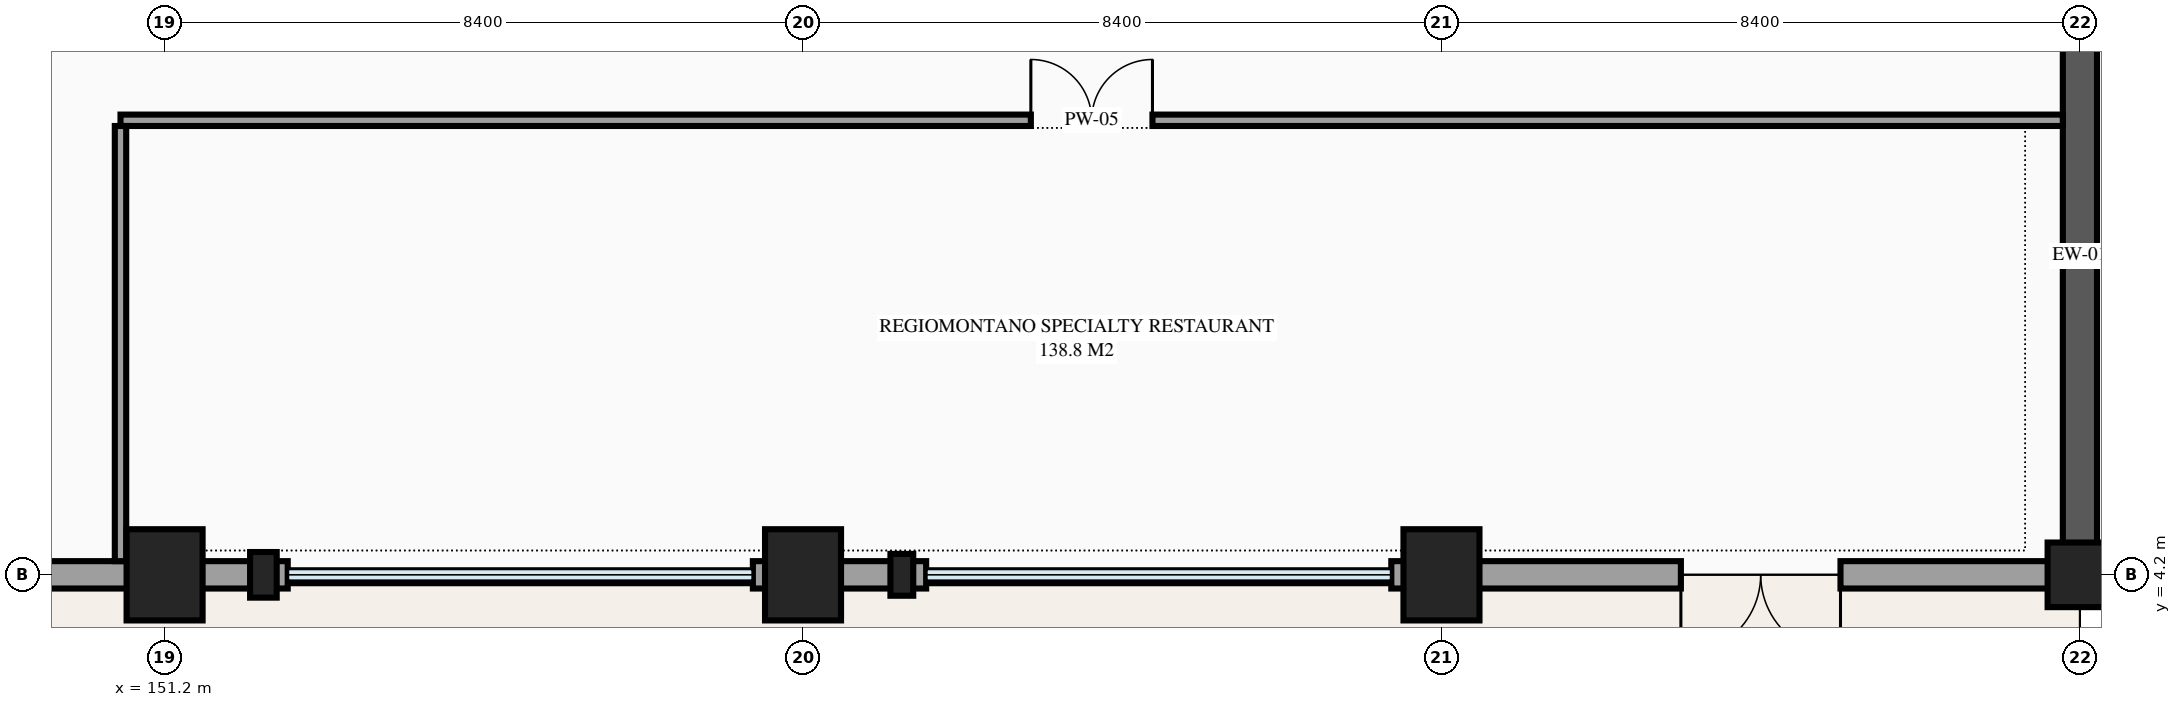
"""IFC4 building model, lengths in metres.
Left out: names, types, materials, properties, quantities, classifications, styles, units other than length and angle.
Written with IfcOpenShell. Run it as: python <this file> out.ifc"""

import sys

from ifc_helpers import new_model, si_unit, direction, frame, frame_2d, origin, origin_2d, place, context, subcontext, project, spatial, rectangle, extrude, element, fill, save


model = new_model("IFC4")
c1 = context("Model", 3, precision=1e-05, world=origin(), true_north=direction((0.0, 1.0)))
c2 = subcontext(c1, "Body", "Model", "MODEL_VIEW")
j1 = project(units=[si_unit("LENGTHUNIT", "METRE"), si_unit("PLANEANGLEUNIT", "RADIAN")], contexts=[c1])
p1 = place(None, origin())
s1 = spatial("IfcSite", under=j1, at=p1, CompositionType="ELEMENT")
p2 = place(p1, origin())
s2 = spatial("IfcBuilding", under=s1, at=p2, CompositionType="ELEMENT")
p3 = place(p2, origin())
s3 = spatial("IfcBuildingStorey", under=s2, at=p3, CompositionType="ELEMENT", Elevation=0.0)
for number, where, z_axis, x_axis in (
    (1, (151.2, 4.2, 0.0), (0.0, 0.0, 1.0), (1.0, 0.0, 0.0)),
    (2, (159.6, 4.2, 0.0), (0.0, 0.0, 1.0), (1.0, 0.0, 0.0)),
    (3, (168.0, 4.2, 0.0), (0.0, 0.0, 1.0), (1.0, 0.0, 0.0)),
):
    element("IfcColumn", number, at=place(p3, frame(where, z_axis=z_axis, x_axis=x_axis)), inside=s3, PredefinedType="COLUMN", context=c2, shape_type="SweptSolid", body=[
        extrude(rectangle(XDim=1.0, YDim=1.2, at=origin_2d()), origin(), (0.0, 0.0, 1.0), 5.4),
    ])
p4 = place(p3, frame((176.4, 4.2, 0.0), z_axis=(0.0, 0.0, 1.0), x_axis=(1.0, 0.0, 0.0)))
e4 = element("IfcColumn", 4, at=p4, inside=s3, PredefinedType="COLUMN", context=c2, shape_type="SweptSolid", body=[
    extrude(rectangle(XDim=0.85, YDim=0.85, at=origin_2d()), origin(), (0.0, 0.0, 1.0), 5.4),
])
p5 = place(p3, frame((152.5, 4.2, 0.0), z_axis=(0.0, 0.0, 1.0), x_axis=(1.0, 0.0, 0.0)))
e5 = element("IfcColumn", 5, at=p5, inside=s3, PredefinedType="PILASTER", context=c2, shape_type="SweptSolid", body=[
    extrude(rectangle(XDim=0.35, YDim=0.6, at=origin_2d()), origin(), (0.0, 0.0, 1.0), 5.4),
])
p6 = place(p3, frame((160.9, 4.2, 0.0), z_axis=(0.0, 0.0, 1.0), x_axis=(1.0, 0.0, 0.0)))
e6 = element("IfcColumn", 6, at=p6, inside=s3, PredefinedType="PILASTER", context=c2, shape_type="SweptSolid", body=[
    extrude(rectangle(XDim=0.3, YDim=0.55, at=origin_2d()), origin(), (0.0, 0.0, 1.0), 5.4),
])
p7 = place(p3, frame((142.8, 4.2, 0.0), z_axis=(0.0, 0.0, 1.0), x_axis=(1.0, 0.0, 0.0)))
e7 = element("IfcWall", 7, at=p7, inside=s3, PredefinedType="STANDARD", context=c2, shape_type="SweptSolid", body=[
    extrude(rectangle(XDim=8.4, YDim=0.36, at=frame_2d((4.2, 0.0))), origin(), (0.0, 0.0, 1.0), 4.19),
])
p8 = place(p7, frame((5.25, 0.0, 0.0), z_axis=(0.0, 0.0, 1.0), x_axis=(-1.0, 0.0, 0.0)))
e8 = element("IfcOpeningElement", 8, at=p8, cuts=e7, PredefinedType="OPENING", context=c2, shape_type="SweptSolid", body=[
    extrude(rectangle(XDim=2.1, YDim=2.4, at=frame_2d((1.05, 1.2))), frame((0.0, 0.19, 0.0), z_axis=(0.0, -1.0, 0.0), x_axis=(1.0, 0.0, 0.0)), (0.0, 0.0, 1.0), 0.38),
])
p9 = place(p3, frame((151.2, 4.2, 0.0), z_axis=(0.0, 0.0, 1.0), x_axis=(1.0, 0.0, 0.0)))
e9 = element("IfcWall", 9, at=p9, inside=s3, PredefinedType="STANDARD", context=c2, shape_type="SweptSolid", body=[
    extrude(rectangle(XDim=1.62, YDim=0.36, at=frame_2d((0.81, 0.0))), origin(), (0.0, 0.0, 1.0), 4.83),
])
p10 = place(p3, frame((158.94, 4.2, 0.0), z_axis=(0.0, 0.0, 1.0), x_axis=(1.0, 0.0, 0.0)))
e10 = element("IfcWall", 10, at=p10, inside=s3, PredefinedType="STANDARD", context=c2, shape_type="SweptSolid", body=[
    extrude(rectangle(XDim=0.66, YDim=0.36, at=frame_2d((0.33, 0.0))), origin(), (0.0, 0.0, 1.0), 5.4),
])
p11 = place(p3, frame((159.6, 4.2, 0.0), z_axis=(0.0, 0.0, 1.0), x_axis=(1.0, 0.0, 0.0)))
e11 = element("IfcWall", 11, at=p11, inside=s3, PredefinedType="STANDARD", context=c2, shape_type="SweptSolid", body=[
    extrude(rectangle(XDim=1.62, YDim=0.36, at=frame_2d((0.81, 0.0))), origin(), (0.0, 0.0, 1.0), 4.607),
])
p12 = place(p3, frame((167.34, 4.2, 0.0), z_axis=(0.0, 0.0, 1.0), x_axis=(1.0, 0.0, 0.0)))
e12 = element("IfcWall", 12, at=p12, inside=s3, PredefinedType="STANDARD", context=c2, shape_type="SweptSolid", body=[
    extrude(rectangle(XDim=0.66, YDim=0.36, at=frame_2d((0.33, 0.0))), origin(), (0.0, 0.0, 1.0), 5.4),
])
p13 = place(p3, frame((168.0, 4.2, 0.0), z_axis=(0.0, 0.0, 1.0), x_axis=(1.0, 0.0, 0.0)))
e13 = element("IfcWall", 13, at=p13, inside=s3, PredefinedType="STANDARD", context=c2, shape_type="SweptSolid", body=[
    extrude(rectangle(XDim=8.4, YDim=0.36, at=frame_2d((4.2, 0.0))), origin(), (0.0, 0.0, 1.0), 4.34),
])
p14 = place(p13, frame((5.25, 0.0, 0.0), z_axis=(0.0, 0.0, 1.0), x_axis=(-1.0, 0.0, 0.0)))
e14 = element("IfcOpeningElement", 14, at=p14, cuts=e13, PredefinedType="OPENING", context=c2, shape_type="SweptSolid", body=[
    extrude(rectangle(XDim=2.1, YDim=2.4, at=frame_2d((1.05, 1.2))), frame((0.0, 0.19, 0.0), z_axis=(0.0, -1.0, 0.0), x_axis=(1.0, 0.0, 0.0)), (0.0, 0.0, 1.0), 0.38),
])
p15 = place(p3, frame((176.4, 4.2, 0.0), z_axis=(0.0, 0.0, 1.0), x_axis=(0.0, 1.0, 0.0)))
e15 = element("IfcWall", 15, at=p15, inside=s3, PredefinedType="STANDARD", context=c2, shape_type="SweptSolid", body=[
    extrude(rectangle(XDim=8.4, YDim=0.45, at=frame_2d((4.2, 0.0))), origin(), (0.0, 0.0, 1.0), 5.4),
])
p16 = place(p3, frame((150.62, 10.18, 0.0), z_axis=(0.0, 0.0, 1.0), x_axis=(1.0, 0.0, 0.0)))
e16 = element("IfcWall", 16, at=p16, inside=s3, PredefinedType="PARTITIONING", context=c2, shape_type="SweptSolid", body=[
    extrude(rectangle(XDim=25.555, YDim=0.15, at=frame_2d((12.777, 0.0))), origin(), (0.0, 0.0, 1.0), 5.135),
])
p17 = place(p16, frame((11.978, 0.0, 0.0)))
e17 = element("IfcOpeningElement", 17, at=p17, cuts=e16, PredefinedType="OPENING", context=c2, shape_type="SweptSolid", body=[
    extrude(rectangle(XDim=1.6, YDim=2.25, at=frame_2d((0.8, 1.125))), frame((0.0, 0.085, 0.0), z_axis=(0.0, -1.0, 0.0), x_axis=(1.0, 0.0, 0.0)), (0.0, 0.0, 1.0), 0.17),
])
p18 = place(p3, frame((150.62, 4.38, 0.0), z_axis=(0.0, 0.0, 1.0), x_axis=(0.0, 1.0, 0.0)))
e18 = element("IfcWall", 18, at=p18, inside=s3, PredefinedType="PARTITIONING", context=c2, shape_type="SweptSolid", body=[
    extrude(rectangle(XDim=5.725, YDim=0.15, at=frame_2d((2.863, 0.0))), origin(), (0.0, 0.0, 1.0), 5.135),
])
p19 = place(p14, origin())
e19 = element("IfcDoor", 19, at=p19, inside=s3, OperationType="DOUBLE_DOOR_SINGLE_SWING", PredefinedType="DOOR", context=c2, shape_type="SweptSolid", body=[
    extrude(rectangle(XDim=2.1, YDim=2.4, at=frame_2d((1.05, 1.2))), frame((0.0, 0.025, 0.0), z_axis=(0.0, -1.0, 0.0), x_axis=(1.0, 0.0, 0.0)), (0.0, 0.0, 1.0), 0.05),
])
fill(e14, e19)
p20 = place(p17, origin())
e20 = element("IfcDoor", 20, at=p20, inside=s3, OperationType="DOUBLE_DOOR_SINGLE_SWING", PredefinedType="DOOR", context=c2, shape_type="SweptSolid", body=[
    extrude(rectangle(XDim=1.6, YDim=2.25, at=frame_2d((0.8, 1.125))), frame((0.0, 0.025, 0.0), z_axis=(0.0, -1.0, 0.0), x_axis=(1.0, 0.0, 0.0)), (0.0, 0.0, 1.0), 0.05),
])
fill(e17, e20)
save(model, sys.argv[1])
